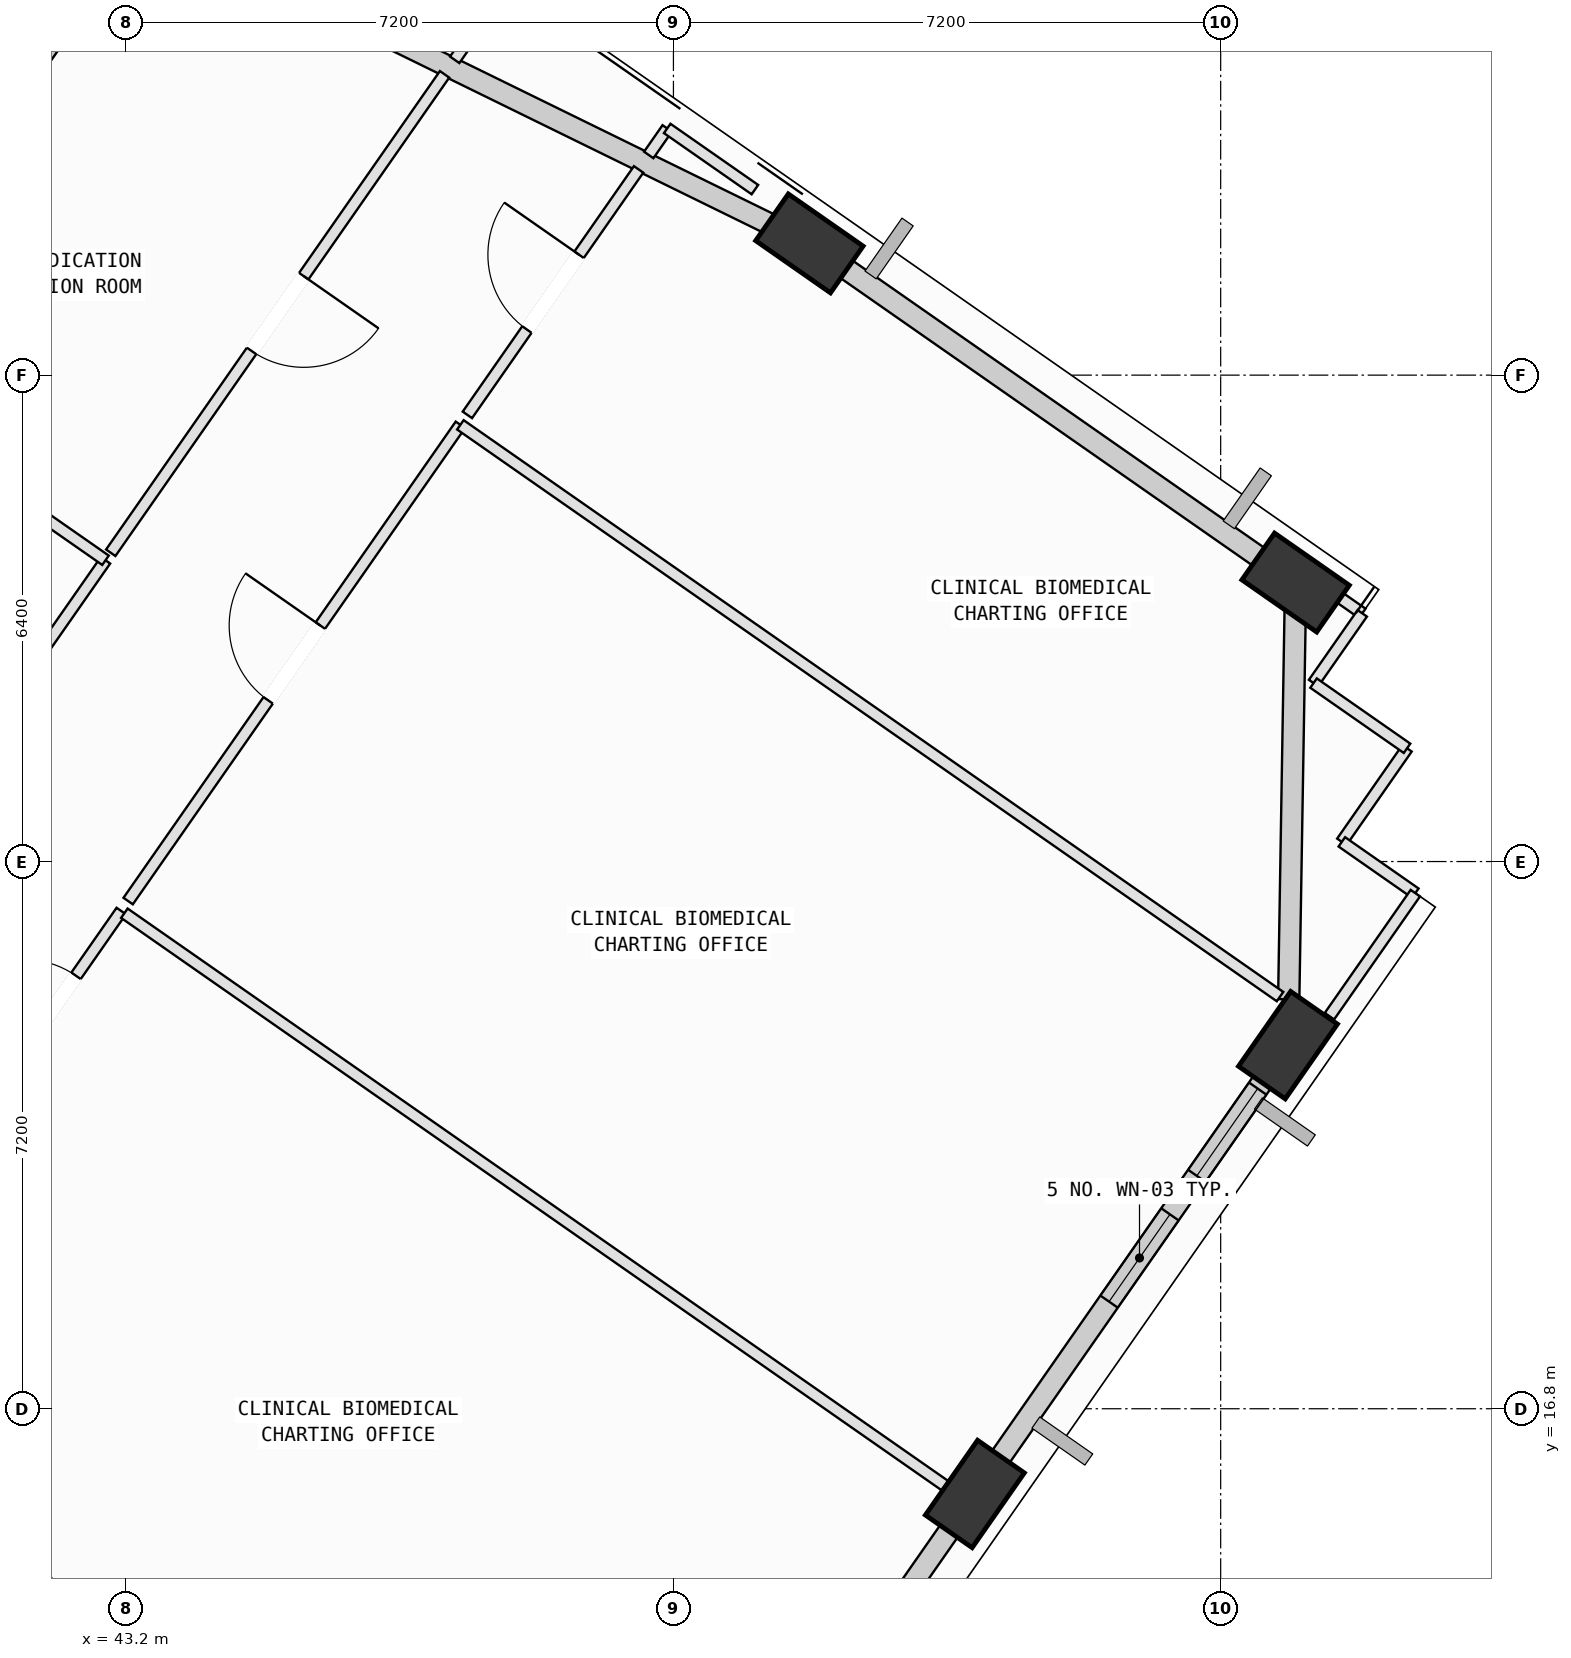
"""IFC4 building model, lengths in metres.
Left out: names, types, materials, properties, quantities, classifications, styles, units other than length and angle.
Written with IfcOpenShell. Run it as: python <this file> out.ifc"""

import sys

from ifc_helpers import new_model, si_unit, direction, frame, frame_2d, origin, origin_2d, place, context, subcontext, project, spatial, rectangle, extrude, element, fill, save


model = new_model("IFC4")
c1 = context("Model", 3, precision=1e-05, world=origin(), true_north=direction((0.0, 1.0)))
c2 = subcontext(c1, "Body", "Model", "MODEL_VIEW")
j1 = project(units=[si_unit("LENGTHUNIT", "METRE"), si_unit("PLANEANGLEUNIT", "RADIAN")], contexts=[c1])
p1 = place(None, origin())
s1 = spatial("IfcSite", under=j1, at=p1, CompositionType="ELEMENT")
p2 = place(p1, origin())
s2 = spatial("IfcBuilding", under=s1, at=p2, CompositionType="ELEMENT")
p3 = place(p2, frame((0.0, 0.0, 259.2)))
s3 = spatial("IfcBuildingStorey", under=s2, at=p3, CompositionType="ELEMENT", Elevation=259.2)
p4 = place(p3, frame((54.366, 15.678, 0.002), z_axis=(0.03691932488, 0.086063994572, 0.995605319536), x_axis=(-0.847717972031, -0.524857195054, 0.076806019917)))
e1 = element("IfcColumn", 1, at=p4, inside=s3, PredefinedType="COLUMN", context=c2, shape_type="SweptSolid", body=[
    extrude(rectangle(XDim=1.2, YDim=0.75, at=origin_2d()), origin(), (0.0, 0.0, 1.0), 4.014),
])
p5 = place(p3, frame((58.485, 21.584, 0.002), z_axis=(0.012395734338, 0.102690152111, 0.994636153792), x_axis=(-0.665782441812, -0.741307709534, 0.084832894327)))
e2 = element("IfcColumn", 2, at=p5, inside=s3, PredefinedType="COLUMN", context=c2, shape_type="SweptSolid", body=[
    extrude(rectangle(XDim=1.2, YDim=0.75, at=origin_2d()), origin(), (0.0, 0.0, 1.0), 4.018),
])
p6 = place(p3, frame((58.586, 27.671, 0.002), z_axis=(-0.012699185613, 0.102930241281, 0.994607508575), x_axis=(0.883660600757, -0.464352223907, 0.059337634117)))
e3 = element("IfcColumn", 3, at=p6, inside=s3, PredefinedType="COLUMN", context=c2, shape_type="SweptSolid", body=[
    extrude(rectangle(XDim=1.2, YDim=0.75, at=origin_2d()), origin(), (0.0, 0.0, 1.0), 4.018),
])
p7 = place(p3, frame((52.189, 32.134, 0.002), z_axis=(-0.030928368187, 0.076529446477, 0.996587517413), x_axis=(0.974050848786, -0.221347232866, 0.047226544254)))
e4 = element("IfcColumn", 4, at=p7, inside=s3, PredefinedType="COLUMN", context=c2, shape_type="SweptSolid", body=[
    extrude(rectangle(XDim=1.2, YDim=0.75, at=origin_2d()), origin(), (0.0, 0.0, 1.0), 4.01),
])
p8 = place(p3, frame((54.245, 15.505, 0.0), z_axis=(0.0, 0.0, 1.0), x_axis=(-0.572154773517, -0.820145667026, 0.0)))
e5 = element("IfcWall", 5, at=p8, inside=s3, PredefinedType="SOLIDWALL", context=c2, shape_type="SweptSolid", body=[
    extrude(rectangle(XDim=6.407, YDim=0.28, at=frame_2d((3.204, 0.0))), origin(), (0.0, 0.0, 1.0), 3.265),
])
p9 = place(p8, frame((2.204, 0.0, 0.75)))
e6 = element("IfcOpeningElement", 6, at=p9, cuts=e5, PredefinedType="OPENING", context=c2, shape_type="SweptSolid", body=[
    extrude(rectangle(XDim=2.0, YDim=1.95, at=frame_2d((1.0, 0.975))), frame((0.0, 0.15, 0.0), z_axis=(0.0, -1.0, 0.0), x_axis=(1.0, 0.0, 0.0)), (0.0, 0.0, 1.0), 0.3),
])
p10 = place(p3, frame((58.37, 21.418, 0.0), z_axis=(0.0, 0.0, 1.0), x_axis=(-0.572149467016, -0.820149368953, 0.0)))
e7 = element("IfcWall", 7, at=p10, inside=s3, PredefinedType="SOLIDWALL", context=c2, shape_type="SweptSolid", body=[
    extrude(rectangle(XDim=6.418, YDim=0.28, at=frame_2d((3.209, 0.0))), origin(), (0.0, 0.0, 1.0), 3.265),
])
p11 = place(p10, frame((2.512, 0.0, 0.75)))
e8 = element("IfcOpeningElement", 8, at=p11, cuts=e7, PredefinedType="OPENING", context=c2, shape_type="SweptSolid", body=[
    extrude(rectangle(XDim=1.4, YDim=1.85, at=frame_2d((0.7, 0.925))), frame((0.0, 0.15, 0.0), z_axis=(0.0, -1.0, 0.0), x_axis=(1.0, 0.0, 0.0)), (0.0, 0.0, 1.0), 0.3),
])
p12 = place(p10, frame((0.494, 0.0, 0.75)))
e9 = element("IfcOpeningElement", 9, at=p12, cuts=e7, PredefinedType="OPENING", context=c2, shape_type="SweptSolid", body=[
    extrude(rectangle(XDim=1.4, YDim=1.85, at=frame_2d((0.7, 0.925))), frame((0.0, 0.15, 0.0), z_axis=(0.0, -1.0, 0.0), x_axis=(1.0, 0.0, 0.0)), (0.0, 0.0, 1.0), 0.3),
])
p13 = place(p3, frame((58.583, 27.481, 0.0), z_axis=(0.0, 0.0, 1.0), x_axis=(-0.01655524398, -0.999862952557, 0.0)))
e10 = element("IfcWall", 10, at=p13, inside=s3, PredefinedType="SOLIDWALL", context=c2, shape_type="SweptSolid", body=[
    extrude(rectangle(XDim=5.294, YDim=0.28, at=frame_2d((2.647, 0.0))), origin(), (0.0, 0.0, 1.0), 3.265),
])
p14 = place(p3, frame((52.393, 31.991, 0.0), z_axis=(0.0, 0.0, 1.0), x_axis=(0.820153799644, -0.572143115776, 0.0)))
e11 = element("IfcWall", 11, at=p14, inside=s3, PredefinedType="SOLIDWALL", context=c2, shape_type="SweptSolid", body=[
    extrude(rectangle(XDim=7.046, YDim=0.28, at=frame_2d((3.523, 0.0))), origin(), (0.0, 0.0, 1.0), 3.265),
])
p15 = place(p3, frame((43.621, 36.333, 0.0), z_axis=(0.0, 0.0, 1.0), x_axis=(0.897954429187, -0.440088449182, 0.0)))
e12 = element("IfcWall", 12, at=p15, inside=s3, PredefinedType="SOLIDWALL", context=c2, shape_type="SweptSolid", body=[
    extrude(rectangle(XDim=9.036, YDim=0.28, at=frame_2d((4.518, 0.0))), origin(), (0.0, 0.0, 1.0), 3.265),
])
p16 = place(p3, frame((39.286, 30.591, 0.0), z_axis=(0.0, 0.0, 1.0), x_axis=(0.572151742902, 0.820147781253, 0.0)))
e13 = element("IfcWall", 13, at=p16, inside=s3, PredefinedType="SOLIDWALL", context=c2, shape_type="SweptSolid", body=[
    extrude(rectangle(XDim=6.78, YDim=0.28, at=frame_2d((3.39, 0.0))), origin(), (0.0, 0.0, 1.0), 3.265),
])
p17 = place(p16, frame((2.514, 0.0, 0.75)))
e14 = element("IfcOpeningElement", 14, at=p17, cuts=e13, PredefinedType="OPENING", context=c2, shape_type="SweptSolid", body=[
    extrude(rectangle(XDim=2.0, YDim=1.95, at=frame_2d((1.0, 0.975))), frame((0.0, 0.15, 0.0), z_axis=(0.0, -1.0, 0.0), x_axis=(1.0, 0.0, 0.0)), (0.0, 0.0, 1.0), 0.3),
])
p18 = place(p3, frame((38.672, 16.952, 0.0), z_axis=(0.0, 0.0, 1.0), x_axis=(0.820114703908, -0.57219915452, 0.0)))
e15 = element("IfcWall", 15, at=p18, inside=s3, PredefinedType="PARTITIONING", context=c2, shape_type="SweptSolid", body=[
    extrude(rectangle(XDim=13.485, YDim=0.15, at=frame_2d((6.742, 0.0))), origin(), (0.0, 0.0, 1.0), 3.78),
])
p19 = place(p3, frame((41.259, 20.66, 0.0), z_axis=(0.0, 0.0, 1.0), x_axis=(0.572137337348, 0.820157830672, 0.0)))
e16 = element("IfcWall", 16, at=p19, inside=s3, PredefinedType="PARTITIONING", context=c2, shape_type="SweptSolid", body=[
    extrude(rectangle(XDim=3.279, YDim=0.15, at=frame_2d((1.639, 0.0))), origin(), (0.0, 0.0, 1.0), 3.78),
])
p20 = place(p19, frame((1.039, 0.0, 0.0)))
e17 = element("IfcOpeningElement", 17, at=p20, cuts=e16, PredefinedType="OPENING", context=c2, shape_type="SweptSolid", body=[
    extrude(rectangle(XDim=1.2, YDim=2.15, at=frame_2d((0.6, 1.075))), frame((0.0, 0.085, 0.0), z_axis=(0.0, -1.0, 0.0), x_axis=(1.0, 0.0, 0.0)), (0.0, 0.0, 1.0), 0.17),
])
p21 = place(p3, frame((43.176, 23.32, 0.0), z_axis=(0.0, 0.0, 1.0), x_axis=(0.820147534675, -0.572152096358, 0.0)))
e18 = element("IfcWall", 18, at=p21, inside=s3, PredefinedType="PARTITIONING", context=c2, shape_type="SweptSolid", body=[
    extrude(rectangle(XDim=13.463, YDim=0.15, at=frame_2d((6.732, 0.0))), origin(), (0.0, 0.0, 1.0), 3.78),
])
p22 = place(p3, frame((43.226, 23.48, 0.0), z_axis=(0.0, 0.0, 1.0), x_axis=(0.572106115417, 0.820179610026, 0.0)))
e19 = element("IfcWall", 19, at=p22, inside=s3, PredefinedType="PARTITIONING", context=c2, shape_type="SweptSolid", body=[
    extrude(rectangle(XDim=7.64, YDim=0.15, at=frame_2d((3.82, 0.0))), origin(), (0.0, 0.0, 1.0), 3.78),
])
p23 = place(p22, frame((3.22, 0.0, 0.0)))
e20 = element("IfcOpeningElement", 20, at=p23, cuts=e19, PredefinedType="OPENING", context=c2, shape_type="SweptSolid", body=[
    extrude(rectangle(XDim=1.2, YDim=2.15, at=frame_2d((0.6, 1.075))), frame((0.0, 0.085, 0.0), z_axis=(0.0, -1.0, 0.0), x_axis=(1.0, 0.0, 0.0)), (0.0, 0.0, 1.0), 0.17),
])
p24 = place(p3, frame((47.597, 29.746, 0.0), z_axis=(0.0, 0.0, 1.0), x_axis=(0.820150255488, -0.572148196207, 0.0)))
e21 = element("IfcWall", 21, at=p24, inside=s3, PredefinedType="PARTITIONING", context=c2, shape_type="SweptSolid", body=[
    extrude(rectangle(XDim=13.149, YDim=0.15, at=frame_2d((6.574, 0.0))), origin(), (0.0, 0.0, 1.0), 3.78),
])
p25 = place(p3, frame((58.564, 22.095, 0.0), z_axis=(0.0, 0.0, 1.0), x_axis=(0.820481466705, -0.571673125828, 0.0)))
e22 = element("IfcWall", 22, at=p25, inside=s3, PredefinedType="PARTITIONING", context=c2, shape_type="SweptSolid", body=[
    extrude(rectangle(XDim=0.458, YDim=0.15, at=frame_2d((0.229, 0.0))), origin(), (0.0, 0.0, 1.0), 3.78),
])
p26 = place(p3, frame((58.94, 21.833, 0.0), z_axis=(0.0, 0.0, 1.0), x_axis=(-0.571321988873, -0.820726010938, 0.0)))
e23 = element("IfcWall", 23, at=p26, inside=s3, PredefinedType="PARTITIONING", context=c2, shape_type="SweptSolid", body=[
    extrude(rectangle(XDim=0.667, YDim=0.15, at=frame_2d((0.333, 0.0))), origin(), (0.0, 0.0, 1.0), 3.265),
])
p27 = place(p3, frame((54.887, 16.022, 0.0), z_axis=(0.0, 0.0, 1.0), x_axis=(-0.572635559693, -0.819810048593, 0.0)))
e24 = element("IfcWall", 24, at=p27, inside=s3, PredefinedType="PARTITIONING", context=c2, shape_type="SweptSolid", body=[
    extrude(rectangle(XDim=0.555, YDim=0.15, at=frame_2d((0.278, 0.0))), origin(), (0.0, 0.0, 1.0), 3.265),
])
p28 = place(p3, frame((60.052, 25.49, 0.0), z_axis=(0.0, 0.0, 1.0), x_axis=(-0.571779386992, -0.820407418672, 0.0)))
e25 = element("IfcWall", 25, at=p28, inside=s3, PredefinedType="PARTITIONING", context=c2, shape_type="SweptSolid", body=[
    extrude(rectangle(XDim=1.5, YDim=0.15, at=frame_2d((0.75, 0.0))), origin(), (0.0, 0.0, 1.0), 3.78),
])
p29 = place(p3, frame((59.194, 24.259, 0.0), z_axis=(0.0, 0.0, 1.0), x_axis=(0.819912240949, -0.572489228844, 0.0)))
e26 = element("IfcWall", 26, at=p29, inside=s3, PredefinedType="PARTITIONING", context=c2, shape_type="SweptSolid", body=[
    extrude(rectangle(XDim=1.179, YDim=0.15, at=frame_2d((0.59, 0.0))), origin(), (0.0, 0.0, 1.0), 3.78),
])
p30 = place(p3, frame((60.161, 23.584, 0.0), z_axis=(0.0, 0.0, 1.0), x_axis=(-0.572324731786, -0.820027073569, 0.0)))
e27 = element("IfcWall", 27, at=p30, inside=s3, PredefinedType="PARTITIONING", context=c2, shape_type="SweptSolid", body=[
    extrude(rectangle(XDim=1.974, YDim=0.15, at=frame_2d((0.987, 0.0))), origin(), (0.0, 0.0, 1.0), 3.78),
])
p31 = place(p3, frame((47.689, 29.877, 0.0), z_axis=(0.0, 0.0, 1.0), x_axis=(0.572088498576, 0.820191898154, 0.0)))
e28 = element("IfcWall", 28, at=p31, inside=s3, PredefinedType="PARTITIONING", context=c2, shape_type="SweptSolid", body=[
    extrude(rectangle(XDim=3.938, YDim=0.15, at=frame_2d((1.969, 0.0))), origin(), (0.0, 0.0, 1.0), 3.78),
])
p32 = place(p31, frame((1.369, 0.0, 0.0)))
e29 = element("IfcOpeningElement", 29, at=p32, cuts=e28, PredefinedType="OPENING", context=c2, shape_type="SweptSolid", body=[
    extrude(rectangle(XDim=1.2, YDim=2.15, at=frame_2d((0.6, 1.075))), frame((0.0, 0.085, 0.0), z_axis=(0.0, -1.0, 0.0), x_axis=(1.0, 0.0, 0.0)), (0.0, 0.0, 1.0), 0.17),
])
p33 = place(p3, frame((50.075, 33.297, 0.0), z_axis=(0.0, 0.0, 1.0), x_axis=(0.571804370731, 0.820390005798, 0.0)))
e30 = element("IfcWall", 30, at=p33, inside=s3, PredefinedType="PARTITIONING", context=c2, shape_type="SweptSolid", body=[
    extrude(rectangle(XDim=0.425, YDim=0.15, at=frame_2d((0.213, 0.0))), origin(), (0.0, 0.0, 1.0), 3.78),
])
p34 = place(p3, frame((50.318, 33.646, 0.0), z_axis=(0.0, 0.0, 1.0), x_axis=(0.820143998483, -0.572157165255, 0.0)))
e31 = element("IfcWall", 31, at=p34, inside=s3, PredefinedType="PARTITIONING", context=c2, shape_type="SweptSolid", body=[
    extrude(rectangle(XDim=1.407, YDim=0.15, at=frame_2d((0.703, 0.0))), origin(), (0.0, 0.0, 1.0), 3.265),
])
p35 = place(p3, frame((51.845, 32.58, 0.0), z_axis=(0.0, 0.0, 1.0), x_axis=(0.820746875408, -0.571292015093, 0.0)))
e32 = element("IfcWall", 32, at=p35, inside=s3, PredefinedType="PARTITIONING", context=c2, shape_type="SweptSolid", body=[
    extrude(rectangle(XDim=0.786, YDim=0.15, at=frame_2d((0.393, 0.0))), origin(), (0.0, 0.0, 1.0), 3.265),
])
p36 = place(p3, frame((58.269, 28.099, 0.0), z_axis=(0.0, 0.0, 1.0), x_axis=(0.820097669711, -0.572223568314, 0.0)))
e33 = element("IfcWall", 33, at=p36, inside=s3, PredefinedType="PARTITIONING", context=c2, shape_type="SweptSolid", body=[
    extrude(rectangle(XDim=1.456, YDim=0.15, at=frame_2d((0.728, 0.0))), origin(), (0.0, 0.0, 1.0), 3.265),
])
p37 = place(p3, frame((59.463, 27.266, 0.0), z_axis=(0.0, 0.0, 1.0), x_axis=(-0.572335057341, -0.820019866917, 0.0)))
e34 = element("IfcWall", 34, at=p37, inside=s3, PredefinedType="PARTITIONING", context=c2, shape_type="SweptSolid", body=[
    extrude(rectangle(XDim=1.12, YDim=0.15, at=frame_2d((0.56, 0.0))), origin(), (0.0, 0.0, 1.0), 3.78),
])
p38 = place(p3, frame((58.822, 26.348, 0.0), z_axis=(0.0, 0.0, 1.0), x_axis=(0.820194461806, -0.572084823102, 0.0)))
e35 = element("IfcWall", 35, at=p38, inside=s3, PredefinedType="PARTITIONING", context=c2, shape_type="SweptSolid", body=[
    extrude(rectangle(XDim=1.5, YDim=0.15, at=frame_2d((0.75, 0.0))), origin(), (0.0, 0.0, 1.0), 3.78),
])
p39 = place(p3, frame((42.928, 27.964, 0.0), z_axis=(0.0, 0.0, 1.0), x_axis=(-0.572175077439, -0.820131502113, 0.0)))
e36 = element("IfcWall", 36, at=p39, inside=s3, PredefinedType="PARTITIONING", context=c2, shape_type="SweptSolid", body=[
    extrude(rectangle(XDim=8.788, YDim=0.15, at=frame_2d((4.394, 0.0))), origin(), (0.0, 0.0, 1.0), 3.78),
])
p40 = place(p39, frame((3.794, 0.0, 0.0)))
e37 = element("IfcOpeningElement", 37, at=p40, cuts=e36, PredefinedType="OPENING", context=c2, shape_type="SweptSolid", body=[
    extrude(rectangle(XDim=1.2, YDim=2.15, at=frame_2d((0.6, 1.075))), frame((0.0, 0.085, 0.0), z_axis=(0.0, -1.0, 0.0), x_axis=(1.0, 0.0, 0.0)), (0.0, 0.0, 1.0), 0.17),
])
p41 = place(p3, frame((39.319, 30.481, 0.0), z_axis=(0.0, 0.0, 1.0), x_axis=(0.820231700671, -0.572031430268, 0.0)))
e38 = element("IfcWall", 38, at=p41, inside=s3, PredefinedType="PARTITIONING", context=c2, shape_type="SweptSolid", body=[
    extrude(rectangle(XDim=4.4, YDim=0.15, at=frame_2d((2.2, 0.0))), origin(), (0.0, 0.0, 1.0), 3.78),
])
p42 = place(p3, frame((48.025, 35.27, 0.0), z_axis=(0.0, 0.0, 1.0), x_axis=(-0.572138151462, -0.82015726275, 0.0)))
e39 = element("IfcWall", 39, at=p42, inside=s3, PredefinedType="PARTITIONING", context=c2, shape_type="SweptSolid", body=[
    extrude(rectangle(XDim=0.879, YDim=0.15, at=frame_2d((0.439, 0.0))), origin(), (0.0, 0.0, 1.0), 3.78),
])
p43 = place(p3, frame((47.389, 34.358, 0.0), z_axis=(0.0, 0.0, 1.0), x_axis=(-0.572185078761, -0.820124524474, 0.0)))
e40 = element("IfcWall", 40, at=p43, inside=s3, PredefinedType="PARTITIONING", context=c2, shape_type="SweptSolid", body=[
    extrude(rectangle(XDim=7.676, YDim=0.15, at=frame_2d((3.838, 0.0))), origin(), (0.0, 0.0, 1.0), 3.78),
])
p44 = place(p43, frame((3.238, 0.0, 0.0)))
e41 = element("IfcOpeningElement", 41, at=p44, cuts=e40, PredefinedType="OPENING", context=c2, shape_type="SweptSolid", body=[
    extrude(rectangle(XDim=1.2, YDim=2.15, at=frame_2d((0.6, 1.075))), frame((0.0, 0.085, 0.0), z_axis=(0.0, -1.0, 0.0), x_axis=(1.0, 0.0, 0.0)), (0.0, 0.0, 1.0), 0.17),
])
p45 = place(p3, frame((38.863, 30.946, 0.0), z_axis=(0.0, 0.0, 1.0), x_axis=(0.572137657031, 0.820157607663, 0.0)))
e42 = element("IfcWall", 42, at=p45, inside=s3, PredefinedType="PARTITIONING", context=c2, shape_type="SweptSolid", body=[
    extrude(rectangle(XDim=7.648, YDim=0.15, at=frame_2d((3.824, 0.0))), origin(), (0.0, 0.0, 1.0), 3.265),
])
p46 = place(p11, origin())
e43 = element("IfcWindow", 43, at=p46, inside=s3, PartitioningType="SINGLE_PANEL", PredefinedType="WINDOW", context=c2, shape_type="SweptSolid", body=[
    extrude(rectangle(XDim=1.4, YDim=1.85, at=frame_2d((0.7, 0.925))), frame((0.0, 0.03, 0.0), z_axis=(0.0, -1.0, 0.0), x_axis=(1.0, 0.0, 0.0)), (0.0, 0.0, 1.0), 0.06),
])
fill(e8, e43)
p47 = place(p12, origin())
e44 = element("IfcWindow", 44, at=p47, inside=s3, PartitioningType="SINGLE_PANEL", PredefinedType="WINDOW", context=c2, shape_type="SweptSolid", body=[
    extrude(rectangle(XDim=1.4, YDim=1.85, at=frame_2d((0.7, 0.925))), frame((0.0, 0.03, 0.0), z_axis=(0.0, -1.0, 0.0), x_axis=(1.0, 0.0, 0.0)), (0.0, 0.0, 1.0), 0.06),
])
fill(e9, e44)
p48 = place(p20, origin())
e45 = element("IfcDoor", 45, at=p48, inside=s3, OperationType="SINGLE_SWING_LEFT", PredefinedType="DOOR", context=c2, shape_type="SweptSolid", body=[
    extrude(rectangle(XDim=1.2, YDim=2.15, at=frame_2d((0.6, 1.075))), frame((0.0, 0.025, 0.0), z_axis=(0.0, -1.0, 0.0), x_axis=(1.0, 0.0, 0.0)), (0.0, 0.0, 1.0), 0.05),
])
fill(e17, e45)
p49 = place(p23, origin())
e46 = element("IfcDoor", 46, at=p49, inside=s3, OperationType="SINGLE_SWING_RIGHT", PredefinedType="DOOR", context=c2, shape_type="SweptSolid", body=[
    extrude(rectangle(XDim=1.2, YDim=2.15, at=frame_2d((0.6, 1.075))), frame((0.0, 0.025, 0.0), z_axis=(0.0, -1.0, 0.0), x_axis=(1.0, 0.0, 0.0)), (0.0, 0.0, 1.0), 0.05),
])
fill(e20, e46)
p50 = place(p32, origin())
e47 = element("IfcDoor", 47, at=p50, inside=s3, OperationType="SINGLE_SWING_RIGHT", PredefinedType="DOOR", context=c2, shape_type="SweptSolid", body=[
    extrude(rectangle(XDim=1.2, YDim=2.15, at=frame_2d((0.6, 1.075))), frame((0.0, 0.025, 0.0), z_axis=(0.0, -1.0, 0.0), x_axis=(1.0, 0.0, 0.0)), (0.0, 0.0, 1.0), 0.05),
])
fill(e29, e47)
p51 = place(p44, origin())
e48 = element("IfcDoor", 48, at=p51, inside=s3, OperationType="SINGLE_SWING_LEFT", PredefinedType="DOOR", context=c2, shape_type="SweptSolid", body=[
    extrude(rectangle(XDim=1.2, YDim=2.15, at=frame_2d((0.6, 1.075))), frame((0.0, 0.025, 0.0), z_axis=(0.0, -1.0, 0.0), x_axis=(1.0, 0.0, 0.0)), (0.0, 0.0, 1.0), 0.05),
])
fill(e41, e48)
save(model, sys.argv[1])
